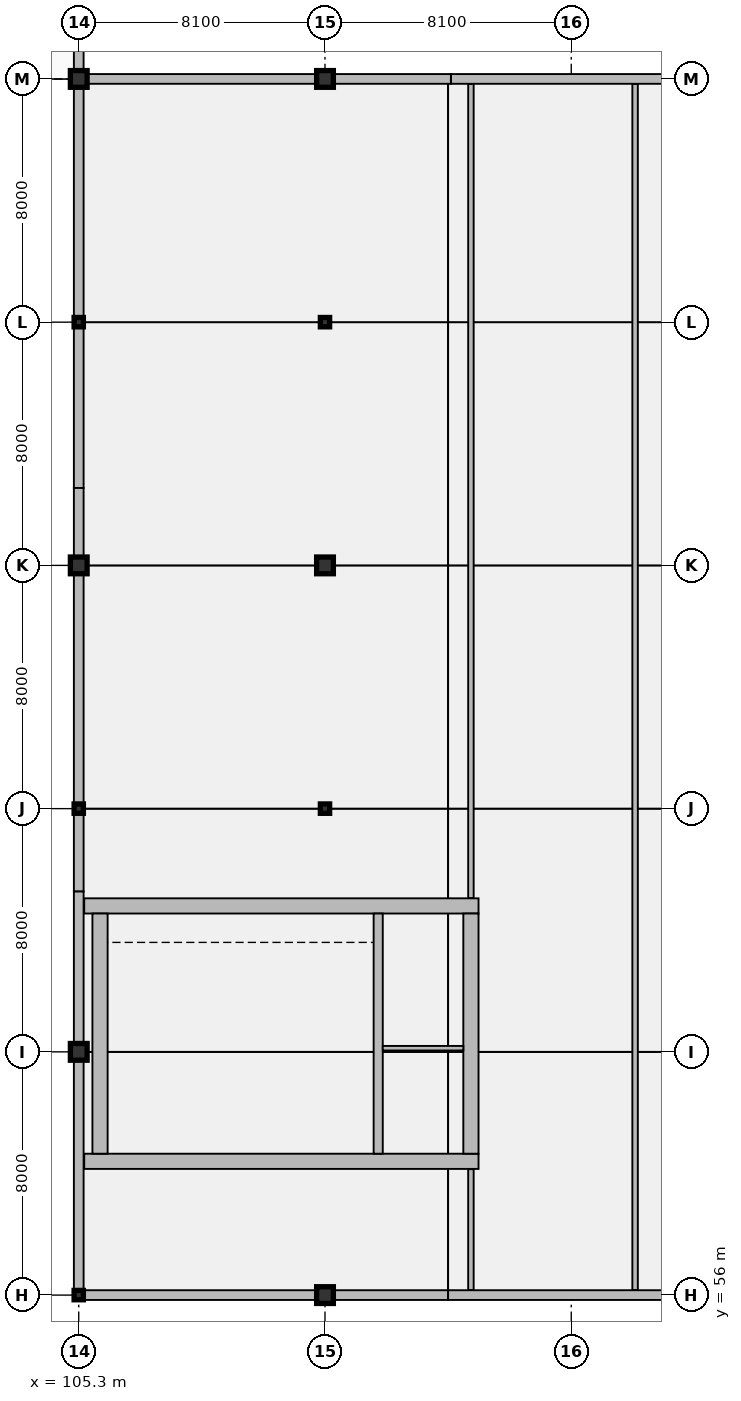
"""IFC4 building model, lengths in metres.
Left out: names, types, materials, properties, quantities, classifications, styles, units other than length and angle.
Written with IfcOpenShell. Run it as: python <this file> out.ifc"""

import sys

from ifc_helpers import new_model, si_unit, direction, frame, frame_2d, origin, origin_2d, place, context, subcontext, project, spatial, rectangle, i_section, extrude, element, fill, save


model = new_model("IFC4")
c1 = context("Model", 3, precision=1e-05, world=origin(), true_north=direction((0.0, 1.0)))
c2 = subcontext(c1, "Body", "Model", "MODEL_VIEW")
j1 = project(units=[si_unit("LENGTHUNIT", "METRE"), si_unit("PLANEANGLEUNIT", "RADIAN")], contexts=[c1])
p1 = place(None, origin())
s1 = spatial("IfcSite", under=j1, at=p1, CompositionType="ELEMENT")
p2 = place(p1, origin())
s2 = spatial("IfcBuilding", under=s1, at=p2, CompositionType="ELEMENT")
p3 = place(p2, frame((0.0, 0.0, 19.8)))
s3 = spatial("IfcBuildingStorey", under=s2, at=p3, CompositionType="ELEMENT", Elevation=19.8)
p4 = place(p3, frame((105.48, 60.4, 0.0), z_axis=(0.0, 0.0, 1.0), x_axis=(1.0, 0.0, 0.0)))
e1 = element("IfcWall", 1, at=p4, inside=s3, PredefinedType="SHEAR", context=c2, shape_type="SweptSolid", body=[
    extrude(rectangle(XDim=12.97, YDim=0.5, at=frame_2d((6.485, 0.0))), origin(), (0.0, 0.0, 1.0), 4.86),
])
p5 = place(p4, frame((1.27, 0.0, 0.0)))
e2 = element("IfcOpeningElement", 2, at=p5, cuts=e1, PredefinedType="OPENING", context=c2, shape_type="SweptSolid", body=[
    extrude(rectangle(XDim=1.15, YDim=2.25, at=frame_2d((0.575, 1.125))), frame((0.0, 0.26, 0.0), z_axis=(0.0, -1.0, 0.0), x_axis=(1.0, 0.0, 0.0)), (0.0, 0.0, 1.0), 0.52),
])
p6 = place(p4, frame((10.475, 0.0, 0.0)))
e3 = element("IfcOpeningElement", 3, at=p6, cuts=e1, PredefinedType="OPENING", context=c2, shape_type="SweptSolid", body=[
    extrude(rectangle(XDim=1.3, YDim=2.3, at=frame_2d((0.65, 1.15))), frame((0.0, 0.26, 0.0), z_axis=(0.0, -1.0, 0.0), x_axis=(1.0, 0.0, 0.0)), (0.0, 0.0, 1.0), 0.52),
])
p7 = place(p3, frame((105.48, 68.8, 0.0), z_axis=(0.0, 0.0, 1.0), x_axis=(1.0, 0.0, 0.0)))
e4 = element("IfcWall", 4, at=p7, inside=s3, PredefinedType="SHEAR", context=c2, shape_type="SweptSolid", body=[
    extrude(rectangle(XDim=12.97, YDim=0.5, at=frame_2d((6.485, 0.0))), origin(), (0.0, 0.0, 1.0), 4.86),
])
for number, where, z_axis, x_axis in (
    (5, (106.0, 60.65, 0.0), (0.0, 0.0, 1.0), (0.0, 1.0, 0.0)),
    (6, (118.2, 60.65, 0.0), (0.0, 0.0, 1.0), (0.0, 1.0, 0.0)),
):
    element("IfcWall", number, at=place(p3, frame(where, z_axis=z_axis, x_axis=x_axis)), inside=s3, PredefinedType="SHEAR", context=c2, shape_type="SweptSolid", body=[
        extrude(rectangle(XDim=7.9, YDim=0.5, at=frame_2d((3.95, 0.0))), origin(), (0.0, 0.0, 1.0), 4.86),
    ])
p8 = place(p3, frame((115.15, 60.65, 0.0), z_axis=(0.0, 0.0, 1.0), x_axis=(0.0, 1.0, 0.0)))
e7 = element("IfcWall", 7, at=p8, inside=s3, PredefinedType="SHEAR", context=c2, shape_type="SweptSolid", body=[
    extrude(rectangle(XDim=7.9, YDim=0.3, at=frame_2d((3.95, 0.0))), origin(), (0.0, 0.0, 1.0), 4.86),
])
p9 = place(p3, frame((105.3, 56.0, 0.0), z_axis=(0.0, 0.0, 1.0), x_axis=(1.0, 0.0, 0.0)))
e8 = element("IfcColumn", 8, at=p9, inside=s3, PredefinedType="COLUMN", context=c2, shape_type="SweptSolid", body=[
    extrude(i_section(OverallWidth=0.305, OverallDepth=0.308, WebThickness=0.01, FlangeThickness=0.015, FilletRadius=0.015, at=origin_2d()), origin(), (0.0, 0.0, 1.0), 4.86),
])
p10 = place(p3, frame((105.3, 64.0, 0.0), z_axis=(0.0, 0.0, 1.0), x_axis=(1.0, 0.0, 0.0)))
e9 = element("IfcColumn", 9, at=p10, inside=s3, PredefinedType="COLUMN", context=c2, shape_type="SweptSolid", body=[
    extrude(rectangle(XDim=0.55, YDim=0.55, at=origin_2d()), origin(), (0.0, 0.0, 1.0), 4.86),
])
p11 = place(p3, frame((105.3, 72.0, 0.0), z_axis=(0.0, 0.0, 1.0), x_axis=(1.0, 0.0, 0.0)))
e10 = element("IfcColumn", 10, at=p11, inside=s3, PredefinedType="COLUMN", context=c2, shape_type="SweptSolid", body=[
    extrude(i_section(OverallWidth=0.305, OverallDepth=0.308, WebThickness=0.01, FlangeThickness=0.015, FilletRadius=0.015, at=origin_2d()), origin(), (0.0, 0.0, 1.0), 4.86),
])
p12 = place(p3, frame((105.3, 80.0, 0.0), z_axis=(0.0, 0.0, 1.0), x_axis=(1.0, 0.0, 0.0)))
e11 = element("IfcColumn", 11, at=p12, inside=s3, PredefinedType="COLUMN", context=c2, shape_type="SweptSolid", body=[
    extrude(rectangle(XDim=0.55, YDim=0.55, at=origin_2d()), origin(), (0.0, 0.0, 1.0), 4.86),
])
p13 = place(p3, frame((105.3, 88.0, 0.0), z_axis=(0.0, 0.0, 1.0), x_axis=(1.0, 0.0, 0.0)))
e12 = element("IfcColumn", 12, at=p13, inside=s3, PredefinedType="COLUMN", context=c2, shape_type="SweptSolid", body=[
    extrude(i_section(OverallWidth=0.305, OverallDepth=0.308, WebThickness=0.01, FlangeThickness=0.015, FilletRadius=0.015, at=origin_2d()), origin(), (0.0, 0.0, 1.0), 4.86),
])
p14 = place(p3, frame((105.3, 96.0, 0.0), z_axis=(0.0, 0.0, 1.0), x_axis=(1.0, 0.0, 0.0)))
e13 = element("IfcColumn", 13, at=p14, inside=s3, PredefinedType="COLUMN", context=c2, shape_type="SweptSolid", body=[
    extrude(rectangle(XDim=0.55, YDim=0.55, at=origin_2d()), origin(), (0.0, 0.0, 1.0), 4.76),
])
p15 = place(p3, frame((113.4, 56.0, 0.0), z_axis=(0.0, 0.0, 1.0), x_axis=(1.0, 0.0, 0.0)))
e14 = element("IfcColumn", 14, at=p15, inside=s3, PredefinedType="COLUMN", context=c2, shape_type="SweptSolid", body=[
    extrude(rectangle(XDim=0.55, YDim=0.55, at=origin_2d()), origin(), (0.0, 0.0, 1.0), 4.86),
])
p16 = place(p3, frame((113.4, 72.0, 0.0), z_axis=(0.0, 0.0, 1.0), x_axis=(1.0, 0.0, 0.0)))
e15 = element("IfcColumn", 15, at=p16, inside=s3, PredefinedType="COLUMN", context=c2, shape_type="SweptSolid", body=[
    extrude(i_section(OverallWidth=0.305, OverallDepth=0.308, WebThickness=0.01, FlangeThickness=0.015, FilletRadius=0.015, at=origin_2d()), origin(), (0.0, 0.0, 1.0), 4.86),
])
p17 = place(p3, frame((113.4, 80.0, 0.0), z_axis=(0.0, 0.0, 1.0), x_axis=(1.0, 0.0, 0.0)))
e16 = element("IfcColumn", 16, at=p17, inside=s3, PredefinedType="COLUMN", context=c2, shape_type="SweptSolid", body=[
    extrude(rectangle(XDim=0.55, YDim=0.55, at=origin_2d()), origin(), (0.0, 0.0, 1.0), 4.86),
])
p18 = place(p3, frame((113.4, 88.0, 0.0), z_axis=(0.0, 0.0, 1.0), x_axis=(1.0, 0.0, 0.0)))
e17 = element("IfcColumn", 17, at=p18, inside=s3, PredefinedType="COLUMN", context=c2, shape_type="SweptSolid", body=[
    extrude(i_section(OverallWidth=0.305, OverallDepth=0.308, WebThickness=0.01, FlangeThickness=0.015, FilletRadius=0.015, at=origin_2d()), origin(), (0.0, 0.0, 1.0), 4.86),
])
p19 = place(p3, frame((113.4, 96.0, 0.0), z_axis=(0.0, 0.0, 1.0), x_axis=(1.0, 0.0, 0.0)))
e18 = element("IfcColumn", 18, at=p19, inside=s3, PredefinedType="COLUMN", context=c2, shape_type="SweptSolid", body=[
    extrude(rectangle(XDim=0.55, YDim=0.55, at=origin_2d()), origin(), (0.0, 0.0, 1.0), 4.86),
])
p20 = place(p3, frame((105.3, 96.18, 0.0), z_axis=(0.0, 0.0, 1.0), x_axis=(0.0, 1.0, 0.0)))
e19 = element("IfcWall", 19, at=p20, inside=s3, PredefinedType="SOLIDWALL", context=c2, shape_type="SweptSolid", body=[
    extrude(rectangle(XDim=15.82, YDim=0.32, at=frame_2d((7.91, 0.0))), origin(), (0.0, 0.0, 1.0), 4.289),
])
p21 = place(p3, frame((129.6, 96.0, 0.0), z_axis=(0.0, 0.0, 1.0), x_axis=(-1.0, 0.0, 0.0)))
e20 = element("IfcWall", 20, at=p21, inside=s3, PredefinedType="SOLIDWALL", context=c2, shape_type="SweptSolid", body=[
    extrude(rectangle(XDim=12.06, YDim=0.32, at=frame_2d((6.03, 0.0))), origin(), (0.0, 0.0, 1.0), 4.86),
])
p22 = place(p21, frame((3.15, 0.0, 0.85)))
e21 = element("IfcOpeningElement", 21, at=p22, cuts=e20, PredefinedType="OPENING", context=c2, shape_type="SweptSolid", body=[
    extrude(rectangle(XDim=1.8, YDim=2.4, at=frame_2d((0.9, 1.2))), frame((0.0, 0.17, 0.0), z_axis=(0.0, -1.0, 0.0), x_axis=(1.0, 0.0, 0.0)), (0.0, 0.0, 1.0), 0.34),
])
p23 = place(p3, frame((117.54, 96.0, 0.0), z_axis=(0.0, 0.0, 1.0), x_axis=(-1.0, 0.0, 0.0)))
e22 = element("IfcWall", 22, at=p23, inside=s3, PredefinedType="SOLIDWALL", context=c2, shape_type="SweptSolid", body=[
    extrude(rectangle(XDim=12.06, YDim=0.32, at=frame_2d((6.03, 0.0))), origin(), (0.0, 0.0, 1.0), 4.86),
])
p24 = place(p23, frame((6.75, 0.0, 0.95)))
e23 = element("IfcOpeningElement", 23, at=p24, cuts=e22, PredefinedType="OPENING", context=c2, shape_type="SweptSolid", body=[
    extrude(rectangle(XDim=2.1, YDim=1.8, at=frame_2d((1.05, 0.9))), frame((0.0, 0.17, 0.0), z_axis=(0.0, -1.0, 0.0), x_axis=(1.0, 0.0, 0.0)), (0.0, 0.0, 1.0), 0.34),
])
p25 = place(p3, frame((105.3, 95.82, 0.0), z_axis=(0.0, 0.0, 1.0), x_axis=(0.0, -1.0, 0.0)))
e24 = element("IfcWall", 24, at=p25, inside=s3, PredefinedType="SOLIDWALL", context=c2, shape_type="SweptSolid", body=[
    extrude(rectangle(XDim=13.273, YDim=0.32, at=frame_2d((6.637, 0.0))), origin(), (0.0, 0.0, 1.0), 4.86),
])
p26 = place(p25, frame((3.6, 0.0, 0.95)))
e25 = element("IfcOpeningElement", 25, at=p26, cuts=e24, PredefinedType="OPENING", context=c2, shape_type="SweptSolid", body=[
    extrude(rectangle(XDim=2.25, YDim=1.8, at=frame_2d((1.125, 0.9))), frame((0.0, 0.17, 0.0), z_axis=(0.0, -1.0, 0.0), x_axis=(1.0, 0.0, 0.0)), (0.0, 0.0, 1.0), 0.34),
])
p27 = place(p3, frame((105.3, 82.547, 0.0), z_axis=(0.0, 0.0, 1.0), x_axis=(0.0, -1.0, 0.0)))
e26 = element("IfcWall", 26, at=p27, inside=s3, PredefinedType="SOLIDWALL", context=c2, shape_type="SweptSolid", body=[
    extrude(rectangle(XDim=13.273, YDim=0.32, at=frame_2d((6.637, 0.0))), origin(), (0.0, 0.0, 1.0), 4.86),
])
p28 = place(p27, frame((5.4, 0.0, 0.95)))
e27 = element("IfcOpeningElement", 27, at=p28, cuts=e26, PredefinedType="OPENING", context=c2, shape_type="SweptSolid", body=[
    extrude(rectangle(XDim=2.4, YDim=1.6, at=frame_2d((1.2, 0.8))), frame((0.0, 0.17, 0.0), z_axis=(0.0, -1.0, 0.0), x_axis=(1.0, 0.0, 0.0)), (0.0, 0.0, 1.0), 0.34),
])
p29 = place(p3, frame((105.3, 69.273, 0.0), z_axis=(0.0, 0.0, 1.0), x_axis=(0.0, -1.0, 0.0)))
e28 = element("IfcWall", 28, at=p29, inside=s3, PredefinedType="SOLIDWALL", context=c2, shape_type="SweptSolid", body=[
    extrude(rectangle(XDim=13.273, YDim=0.32, at=frame_2d((6.637, 0.0))), origin(), (0.0, 0.0, 1.0), 4.86),
])
p30 = place(p3, frame((105.3, 56.0, 0.0), z_axis=(0.0, 0.0, 1.0), x_axis=(1.0, 0.0, 0.0)))
e29 = element("IfcWall", 29, at=p30, inside=s3, PredefinedType="SOLIDWALL", context=c2, shape_type="SweptSolid", body=[
    extrude(rectangle(XDim=12.15, YDim=0.32, at=frame_2d((6.075, 0.0))), origin(), (0.0, 0.0, 1.0), 4.86),
])
p31 = place(p30, frame((2.7, 0.0, 0.95)))
e30 = element("IfcOpeningElement", 30, at=p31, cuts=e29, PredefinedType="OPENING", context=c2, shape_type="SweptSolid", body=[
    extrude(rectangle(XDim=2.7, YDim=1.8, at=frame_2d((1.35, 0.9))), frame((0.0, 0.17, 0.0), z_axis=(0.0, -1.0, 0.0), x_axis=(1.0, 0.0, 0.0)), (0.0, 0.0, 1.0), 0.34),
])
p32 = place(p3, frame((117.45, 56.0, 0.0), z_axis=(0.0, 0.0, 1.0), x_axis=(1.0, 0.0, 0.0)))
e31 = element("IfcWall", 31, at=p32, inside=s3, PredefinedType="SOLIDWALL", context=c2, shape_type="SweptSolid", body=[
    extrude(rectangle(XDim=12.15, YDim=0.32, at=frame_2d((6.075, 0.0))), origin(), (0.0, 0.0, 1.0), 4.86),
])
p33 = place(p32, frame((2.7, 0.0, 0.85)))
e32 = element("IfcOpeningElement", 32, at=p33, cuts=e31, PredefinedType="OPENING", context=c2, shape_type="SweptSolid", body=[
    extrude(rectangle(XDim=2.7, YDim=2.1, at=frame_2d((1.35, 1.05))), frame((0.0, 0.17, 0.0), z_axis=(0.0, -1.0, 0.0), x_axis=(1.0, 0.0, 0.0)), (0.0, 0.0, 1.0), 0.34),
])
p34 = place(p3, frame((115.3, 64.12, 0.0), z_axis=(0.0, 0.0, 1.0), x_axis=(1.0, 0.0, 0.0)))
e33 = element("IfcWall", 33, at=p34, inside=s3, PredefinedType="PARTITIONING", context=c2, shape_type="SweptSolid", body=[
    extrude(rectangle(XDim=2.65, YDim=0.15, at=frame_2d((1.325, 0.0))), origin(), (0.0, 0.0, 1.0), 4.86),
])
p35 = place(p3, frame((118.2, 56.168, 0.0), z_axis=(0.0, 0.0, 1.0), x_axis=(0.0, 1.0, 0.0)))
e34 = element("IfcWall", 34, at=p35, inside=s3, PredefinedType="PARTITIONING", context=c2, shape_type="SweptSolid", body=[
    extrude(rectangle(XDim=3.974, YDim=0.18, at=frame_2d((1.987, 0.0))), origin(), (0.0, 0.0, 1.0), 4.86),
])
p36 = place(p35, frame((1.387, 0.0, 0.0)))
e35 = element("IfcOpeningElement", 35, at=p36, cuts=e34, PredefinedType="OPENING", context=c2, shape_type="SweptSolid", body=[
    extrude(rectangle(XDim=1.2, YDim=2.2, at=frame_2d((0.6, 1.1))), frame((0.0, 0.1, 0.0), z_axis=(0.0, -1.0, 0.0), x_axis=(1.0, 0.0, 0.0)), (0.0, 0.0, 1.0), 0.2),
])
p37 = place(p3, frame((118.2, 69.058, 0.0), z_axis=(0.0, 0.0, 1.0), x_axis=(0.0, 1.0, 0.0)))
e36 = element("IfcWall", 36, at=p37, inside=s3, PredefinedType="PARTITIONING", context=c2, shape_type="SweptSolid", body=[
    extrude(rectangle(XDim=26.774, YDim=0.18, at=frame_2d((13.387, 0.0))), origin(), (0.0, 0.0, 1.0), 4.86),
])
p38 = place(p37, frame((12.887, 0.0, 0.0)))
e37 = element("IfcOpeningElement", 37, at=p38, cuts=e36, PredefinedType="OPENING", context=c2, shape_type="SweptSolid", body=[
    extrude(rectangle(XDim=1.0, YDim=2.2, at=frame_2d((0.5, 1.1))), frame((0.0, 0.1, 0.0), z_axis=(0.0, -1.0, 0.0), x_axis=(1.0, 0.0, 0.0)), (0.0, 0.0, 1.0), 0.2),
])
p39 = place(p3, frame((123.6, 56.168, 0.0), z_axis=(0.0, 0.0, 1.0), x_axis=(0.0, 1.0, 0.0)))
e38 = element("IfcWall", 38, at=p39, inside=s3, PredefinedType="PARTITIONING", context=c2, shape_type="SweptSolid", body=[
    extrude(rectangle(XDim=39.664, YDim=0.18, at=frame_2d((19.832, 0.0))), origin(), (0.0, 0.0, 1.0), 4.86),
])
p40 = place(p39, frame((19.332, 0.0, 0.0)))
e39 = element("IfcOpeningElement", 39, at=p40, cuts=e38, PredefinedType="OPENING", context=c2, shape_type="SweptSolid", body=[
    extrude(rectangle(XDim=1.0, YDim=2.2, at=frame_2d((0.5, 1.1))), frame((0.0, 0.1, 0.0), z_axis=(0.0, -1.0, 0.0), x_axis=(1.0, 0.0, 0.0)), (0.0, 0.0, 1.0), 0.2),
])
p41 = place(p24, origin())
e40 = element("IfcWindow", 40, at=p41, inside=s3, PartitioningType="DOUBLE_PANEL_VERTICAL", PredefinedType="WINDOW", context=c2, shape_type="SweptSolid", body=[
    extrude(rectangle(XDim=2.1, YDim=1.8, at=frame_2d((1.05, 0.9))), frame((0.0, 0.03, 0.0), z_axis=(0.0, -1.0, 0.0), x_axis=(1.0, 0.0, 0.0)), (0.0, 0.0, 1.0), 0.06),
])
fill(e23, e40)
p42 = place(p26, origin())
e41 = element("IfcWindow", 41, at=p42, inside=s3, PartitioningType="TRIPLE_PANEL_VERTICAL", PredefinedType="WINDOW", context=c2, shape_type="SweptSolid", body=[
    extrude(rectangle(XDim=2.25, YDim=1.8, at=frame_2d((1.125, 0.9))), frame((0.0, 0.03, 0.0), z_axis=(0.0, -1.0, 0.0), x_axis=(1.0, 0.0, 0.0)), (0.0, 0.0, 1.0), 0.06),
])
fill(e25, e41)
p43 = place(p28, origin())
e42 = element("IfcWindow", 42, at=p43, inside=s3, PartitioningType="TRIPLE_PANEL_VERTICAL", PredefinedType="WINDOW", context=c2, shape_type="SweptSolid", body=[
    extrude(rectangle(XDim=2.4, YDim=1.6, at=frame_2d((1.2, 0.8))), frame((0.0, 0.03, 0.0), z_axis=(0.0, -1.0, 0.0), x_axis=(1.0, 0.0, 0.0)), (0.0, 0.0, 1.0), 0.06),
])
fill(e27, e42)
p44 = place(p31, origin())
e43 = element("IfcWindow", 43, at=p44, inside=s3, PartitioningType="TRIPLE_PANEL_VERTICAL", PredefinedType="WINDOW", context=c2, shape_type="SweptSolid", body=[
    extrude(rectangle(XDim=2.7, YDim=1.8, at=frame_2d((1.35, 0.9))), frame((0.0, 0.03, 0.0), z_axis=(0.0, -1.0, 0.0), x_axis=(1.0, 0.0, 0.0)), (0.0, 0.0, 1.0), 0.06),
])
fill(e30, e43)
p45 = place(p33, origin())
e44 = element("IfcWindow", 44, at=p45, inside=s3, PartitioningType="TRIPLE_PANEL_VERTICAL", PredefinedType="WINDOW", context=c2, shape_type="SweptSolid", body=[
    extrude(rectangle(XDim=2.7, YDim=2.1, at=frame_2d((1.35, 1.05))), frame((0.0, 0.03, 0.0), z_axis=(0.0, -1.0, 0.0), x_axis=(1.0, 0.0, 0.0)), (0.0, 0.0, 1.0), 0.06),
])
fill(e32, e44)
p46 = place(p5, origin())
e45 = element("IfcDoor", 45, at=p46, inside=s3, OperationType="SINGLE_SWING_RIGHT", PredefinedType="DOOR", context=c2, shape_type="SweptSolid", body=[
    extrude(rectangle(XDim=1.15, YDim=2.25, at=frame_2d((0.575, 1.125))), frame((0.0, 0.025, 0.0), z_axis=(0.0, -1.0, 0.0), x_axis=(1.0, 0.0, 0.0)), (0.0, 0.0, 1.0), 0.05),
])
fill(e2, e45)
p47 = place(p6, frame((1.3, 0.0, 0.0), z_axis=(0.0, 0.0, 1.0), x_axis=(-1.0, 0.0, 0.0)))
e46 = element("IfcDoor", 46, at=p47, inside=s3, OperationType="DOUBLE_DOOR_SLIDING", PredefinedType="DOOR", context=c2, shape_type="SweptSolid", body=[
    extrude(rectangle(XDim=1.3, YDim=2.3, at=frame_2d((0.65, 1.15))), frame((0.0, 0.025, 0.0), z_axis=(0.0, -1.0, 0.0), x_axis=(1.0, 0.0, 0.0)), (0.0, 0.0, 1.0), 0.05),
])
fill(e3, e46)
p48 = place(p36, frame((1.2, 0.0, 0.0), z_axis=(0.0, 0.0, 1.0), x_axis=(-1.0, 0.0, 0.0)))
e47 = element("IfcDoor", 47, at=p48, inside=s3, OperationType="SINGLE_SWING_RIGHT", PredefinedType="DOOR", context=c2, shape_type="SweptSolid", body=[
    extrude(rectangle(XDim=1.2, YDim=2.2, at=frame_2d((0.6, 1.1))), frame((0.0, 0.025, 0.0), z_axis=(0.0, -1.0, 0.0), x_axis=(1.0, 0.0, 0.0)), (0.0, 0.0, 1.0), 0.05),
])
fill(e35, e47)
p49 = place(p38, origin())
e48 = element("IfcDoor", 48, at=p49, inside=s3, OperationType="SINGLE_SWING_LEFT", PredefinedType="DOOR", context=c2, shape_type="SweptSolid", body=[
    extrude(rectangle(XDim=1.0, YDim=2.2, at=frame_2d((0.5, 1.1))), frame((0.0, 0.025, 0.0), z_axis=(0.0, -1.0, 0.0), x_axis=(1.0, 0.0, 0.0)), (0.0, 0.0, 1.0), 0.05),
])
fill(e37, e48)
p50 = place(p40, frame((1.0, 0.0, 0.0), z_axis=(0.0, 0.0, 1.0), x_axis=(-1.0, 0.0, 0.0)))
e49 = element("IfcDoor", 49, at=p50, inside=s3, OperationType="SINGLE_SWING_RIGHT", PredefinedType="DOOR", context=c2, shape_type="SweptSolid", body=[
    extrude(rectangle(XDim=1.0, YDim=2.2, at=frame_2d((0.5, 1.1))), frame((0.0, 0.025, 0.0), z_axis=(0.0, -1.0, 0.0), x_axis=(1.0, 0.0, 0.0)), (0.0, 0.0, 1.0), 0.05),
])
fill(e39, e49)
save(model, sys.argv[1])
